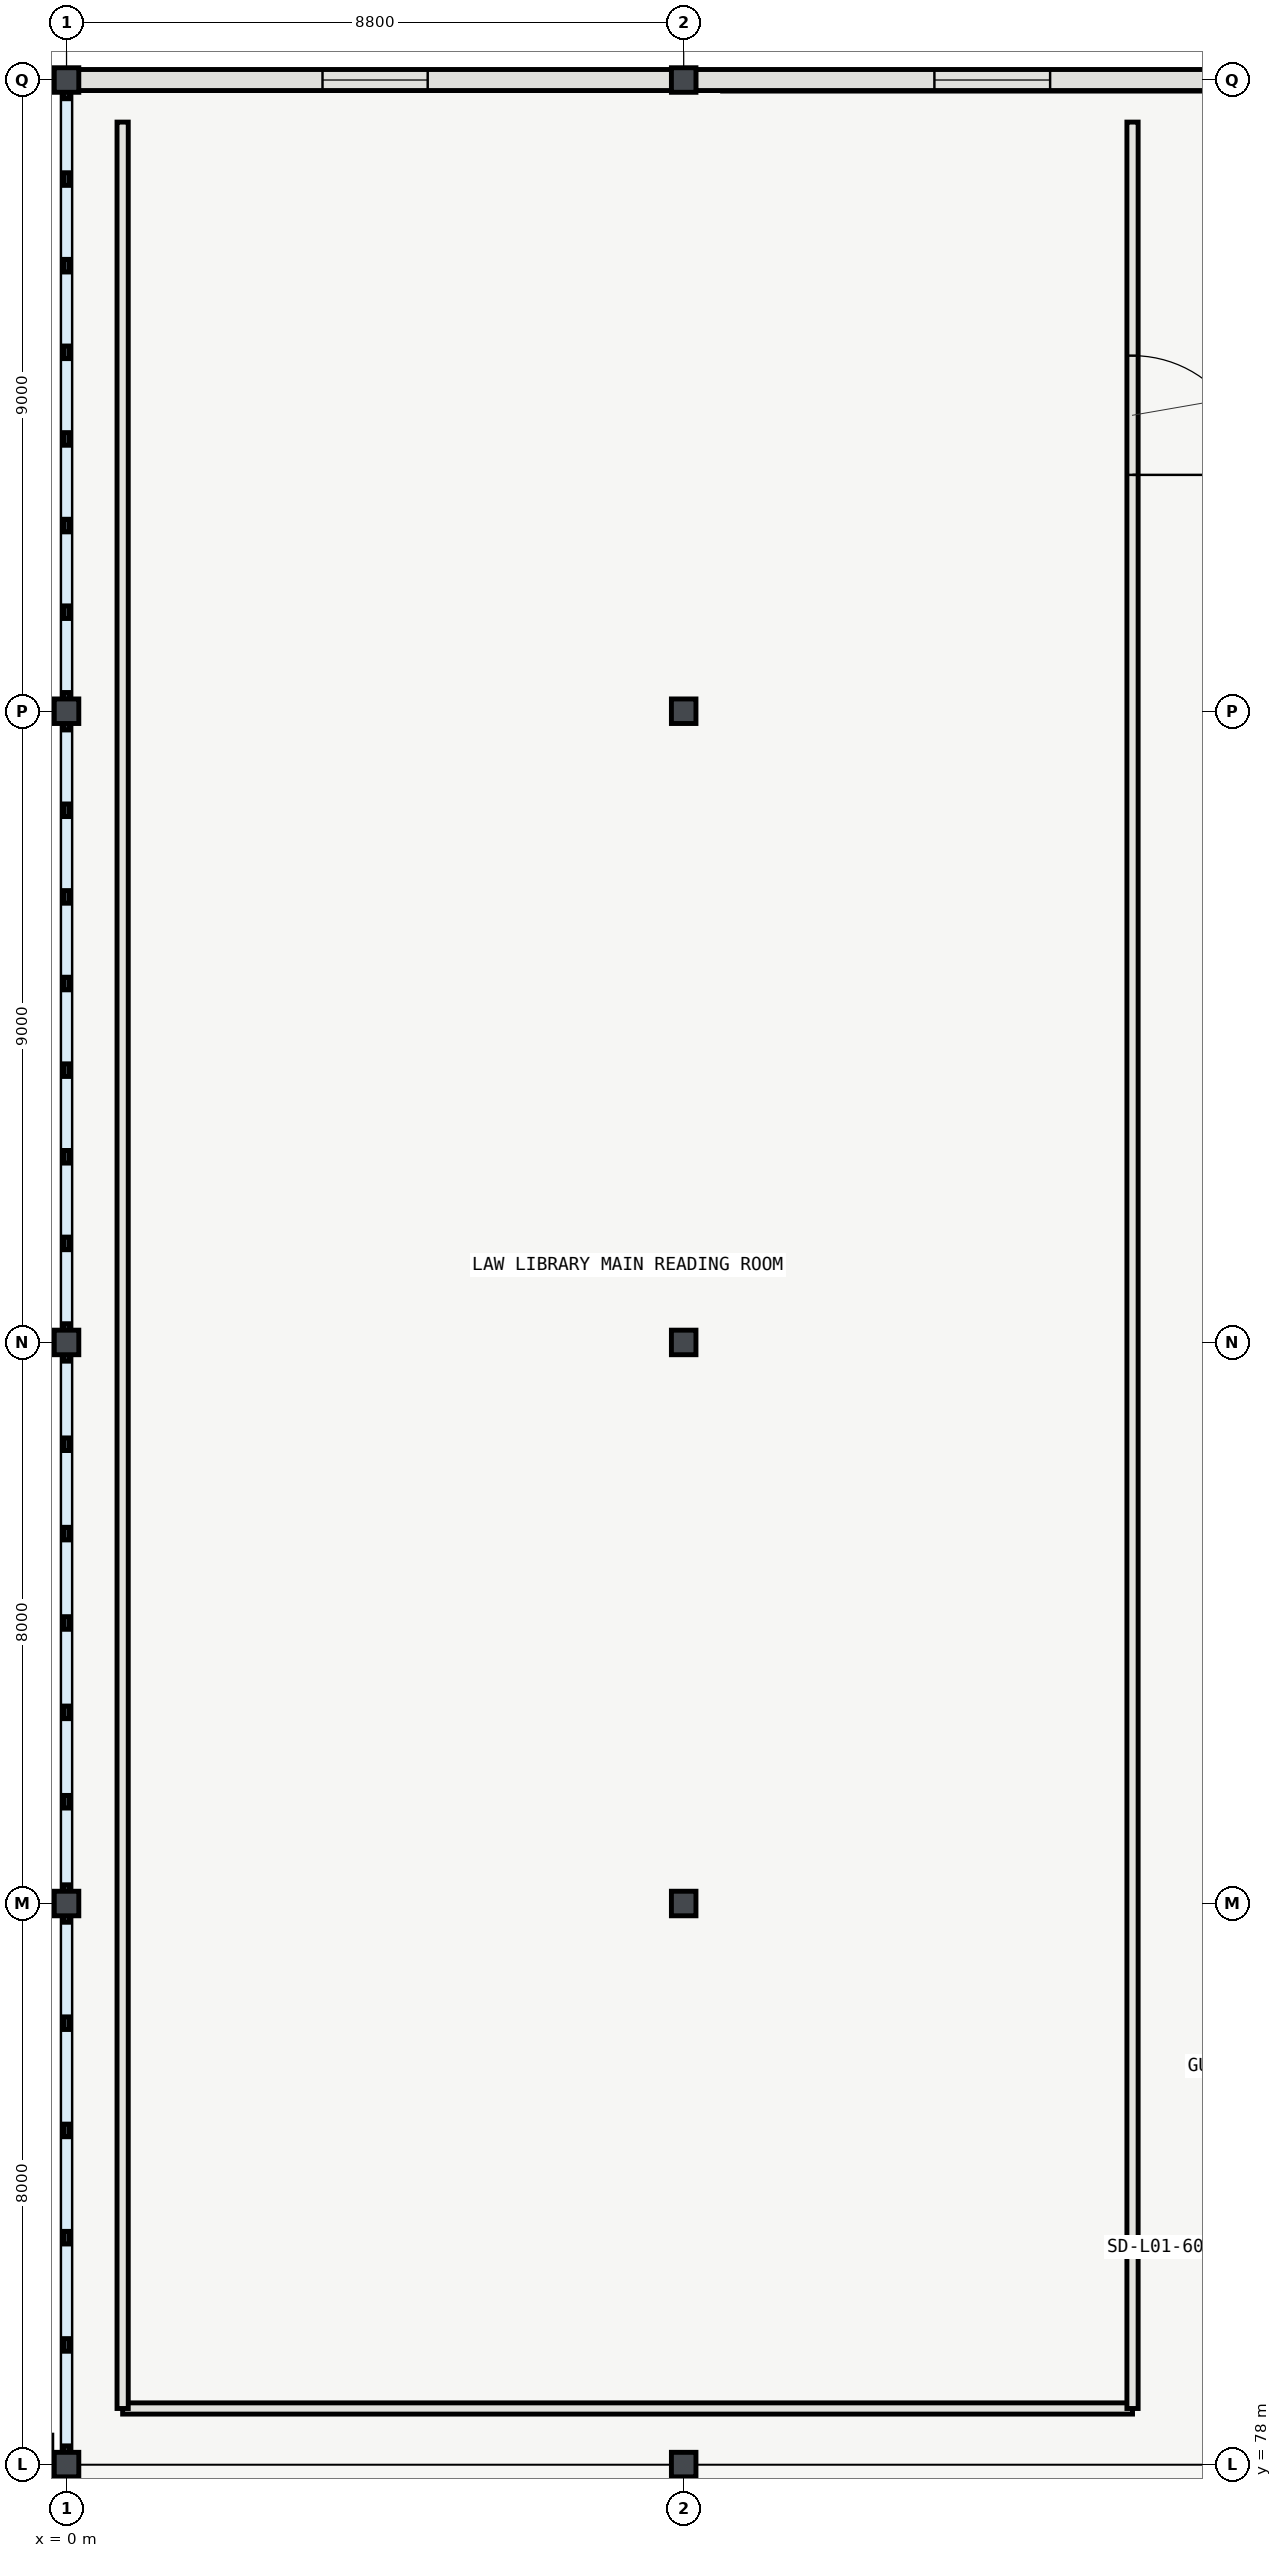
"""IFC4 building model, lengths in metres.
Left out: names, types, materials, properties, quantities, classifications, styles, units other than length and angle.
Written with IfcOpenShell. Run it as: python <this file> out.ifc"""

import sys

from ifc_helpers import new_model, si_unit, direction, frame, frame_2d, origin, origin_2d, place, context, subcontext, project, spatial, rectangle, i_section, extrude, element, fill, save


model = new_model("IFC4")
c1 = context("Model", 3, precision=1e-05, world=origin(), true_north=direction((0.0, 1.0)))
c2 = subcontext(c1, "Body", "Model", "MODEL_VIEW")
j1 = project(units=[si_unit("LENGTHUNIT", "METRE"), si_unit("PLANEANGLEUNIT", "RADIAN")], contexts=[c1])
p1 = place(None, origin())
s1 = spatial("IfcSite", under=j1, at=p1, CompositionType="ELEMENT")
p2 = place(p1, origin())
s2 = spatial("IfcBuilding", under=s1, at=p2, CompositionType="ELEMENT")
p3 = place(p2, frame((0.0, 0.0, 5.4)))
s3 = spatial("IfcBuildingStorey", under=s2, at=p3, CompositionType="ELEMENT", Elevation=5.4)
for number, where, z_axis, x_axis in (
    (1, (0.0, 78.0, 0.0), (0.0, 0.0, 1.0), (1.0, 0.0, 0.0)),
    (2, (0.0, 86.0, 0.0), (0.0, 0.0, 1.0), (1.0, 0.0, 0.0)),
    (3, (0.0, 94.0, 0.0), (0.0, 0.0, 1.0), (1.0, 0.0, 0.0)),
    (4, (0.0, 103.0, 0.0), (0.0, 0.0, 1.0), (1.0, 0.0, 0.0)),
    (5, (0.0, 112.0, 0.0), (0.0, 0.0, 1.0), (1.0, 0.0, 0.0)),
    (6, (8.8, 78.0, 0.0), (0.0, 0.0, 1.0), (1.0, 0.0, 0.0)),
    (7, (8.8, 86.0, 0.0), (0.0, 0.0, 1.0), (1.0, 0.0, 0.0)),
    (8, (8.8, 94.0, 0.0), (0.0, 0.0, 1.0), (1.0, 0.0, 0.0)),
    (9, (8.8, 103.0, 0.0), (0.0, 0.0, 1.0), (1.0, 0.0, 0.0)),
    (10, (8.8, 112.0, 0.0), (0.0, 0.0, 1.0), (1.0, 0.0, 0.0)),
):
    element("IfcColumn", number, at=place(p3, frame(where, z_axis=z_axis, x_axis=x_axis)), inside=s3, PredefinedType="COLUMN", context=c2, shape_type="SweptSolid", body=[
        extrude(i_section(OverallWidth=0.35, OverallDepth=0.35, WebThickness=0.012, FlangeThickness=0.019, FilletRadius=0.02, at=origin_2d()), origin(), (0.0, 0.0, 1.0), 5.4),
    ])
p4 = place(p3, frame((8.629, 112.0, 0.0), z_axis=(0.0, 0.0, 1.0), x_axis=(-1.0, 0.0, 0.0)))
e11 = element("IfcWall", 11, at=p4, inside=s3, PredefinedType="SOLIDWALL", context=c2, shape_type="SweptSolid", body=[
    extrude(rectangle(XDim=8.458, YDim=0.3, at=frame_2d((4.229, 0.0))), origin(), (0.0, 0.0, 1.0), 4.803),
])
p5 = place(p4, frame((3.479, 0.0, 0.95)))
e12 = element("IfcOpeningElement", 12, at=p5, cuts=e11, PredefinedType="OPENING", context=c2, shape_type="SweptSolid", body=[
    extrude(rectangle(XDim=1.5, YDim=1.8, at=frame_2d((0.75, 0.9))), frame((0.0, 0.16, 0.0), z_axis=(0.0, -1.0, 0.0), x_axis=(1.0, 0.0, 0.0)), (0.0, 0.0, 1.0), 0.32),
])
p6 = place(p3, frame((17.429, 112.0, 0.0), z_axis=(0.0, 0.0, 1.0), x_axis=(-1.0, 0.0, 0.0)))
e13 = element("IfcWall", 13, at=p6, inside=s3, PredefinedType="SOLIDWALL", context=c2, shape_type="SweptSolid", body=[
    extrude(rectangle(XDim=8.458, YDim=0.3, at=frame_2d((4.229, 0.0))), origin(), (0.0, 0.0, 1.0), 4.803),
])
p7 = place(p6, frame((3.404, 0.0, 0.95)))
e14 = element("IfcOpeningElement", 14, at=p7, cuts=e13, PredefinedType="OPENING", context=c2, shape_type="SweptSolid", body=[
    extrude(rectangle(XDim=1.65, YDim=1.8, at=frame_2d((0.825, 0.9))), frame((0.0, 0.16, 0.0), z_axis=(0.0, -1.0, 0.0), x_axis=(1.0, 0.0, 0.0)), (0.0, 0.0, 1.0), 0.32),
])
p8 = place(p3, frame((0.8, 78.8, 0.0), z_axis=(0.0, 0.0, 1.0), x_axis=(1.0, 0.0, 0.0)))
e15 = element("IfcWall", 15, at=p8, inside=s3, PredefinedType="PARTITIONING", context=c2, shape_type="SweptSolid", body=[
    extrude(rectangle(XDim=14.4, YDim=0.16, at=frame_2d((7.2, 0.0))), origin(), (0.0, 0.0, 1.0), 5.12),
])
p9 = place(p3, frame((0.8, 111.4, 0.0), z_axis=(0.0, 0.0, 1.0), x_axis=(0.0, -1.0, 0.0)))
e16 = element("IfcWall", 16, at=p9, inside=s3, PredefinedType="PARTITIONING", context=c2, shape_type="SweptSolid", body=[
    extrude(rectangle(XDim=32.6, YDim=0.16, at=frame_2d((16.3, 0.0))), origin(), (0.0, 0.0, 1.0), 5.12),
])
p10 = place(p3, frame((15.2, 78.8, 0.0), z_axis=(0.0, 0.0, 1.0), x_axis=(0.0, 1.0, 0.0)))
e17 = element("IfcWall", 17, at=p10, inside=s3, PredefinedType="PARTITIONING", context=c2, shape_type="SweptSolid", body=[
    extrude(rectangle(XDim=32.6, YDim=0.16, at=frame_2d((16.3, 0.0))), origin(), (0.0, 0.0, 1.0), 5.12),
])
p11 = place(p10, frame((27.57, 0.0, 0.0)))
e18 = element("IfcOpeningElement", 18, at=p11, cuts=e17, PredefinedType="OPENING", context=c2, shape_type="SweptSolid", body=[
    extrude(rectangle(XDim=1.7, YDim=2.3, at=frame_2d((0.85, 1.15))), frame((0.0, 0.09, 0.0), z_axis=(0.0, -1.0, 0.0), x_axis=(1.0, 0.0, 0.0)), (0.0, 0.0, 1.0), 0.18),
])
p12 = place(p5, origin())
e19 = element("IfcWindow", 19, at=p12, inside=s3, PartitioningType="SINGLE_PANEL", PredefinedType="WINDOW", context=c2, shape_type="SweptSolid", body=[
    extrude(rectangle(XDim=1.5, YDim=1.8, at=frame_2d((0.75, 0.9))), frame((0.0, 0.03, 0.0), z_axis=(0.0, -1.0, 0.0), x_axis=(1.0, 0.0, 0.0)), (0.0, 0.0, 1.0), 0.06),
])
fill(e12, e19)
p13 = place(p7, origin())
e20 = element("IfcWindow", 20, at=p13, inside=s3, PartitioningType="SINGLE_PANEL", PredefinedType="WINDOW", context=c2, shape_type="SweptSolid", body=[
    extrude(rectangle(XDim=1.65, YDim=1.8, at=frame_2d((0.825, 0.9))), frame((0.0, 0.03, 0.0), z_axis=(0.0, -1.0, 0.0), x_axis=(1.0, 0.0, 0.0)), (0.0, 0.0, 1.0), 0.06),
])
fill(e14, e20)
p14 = place(p11, origin())
e21 = element("IfcDoor", 21, at=p14, inside=s3, OperationType="DOUBLE_DOOR_SINGLE_SWING", PredefinedType="DOOR", context=c2, shape_type="SweptSolid", body=[
    extrude(rectangle(XDim=1.7, YDim=2.3, at=frame_2d((0.85, 1.15))), frame((0.0, 0.025, 0.0), z_axis=(0.0, -1.0, 0.0), x_axis=(1.0, 0.0, 0.0)), (0.0, 0.0, 1.0), 0.05),
])
fill(e18, e21)
save(model, sys.argv[1])
